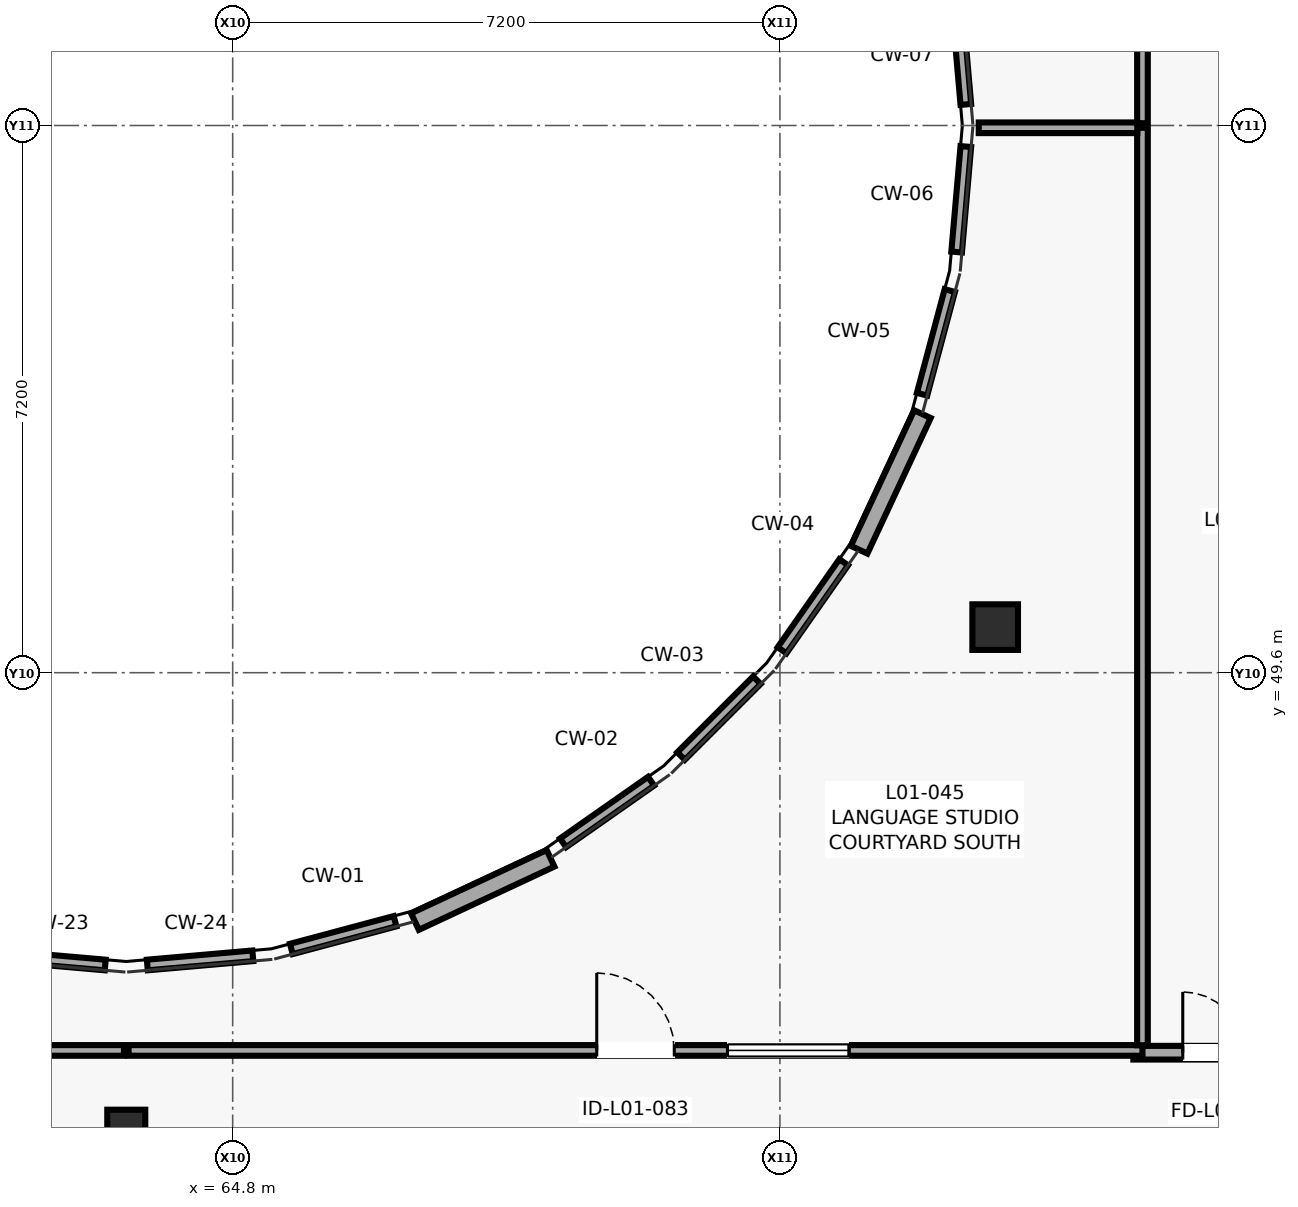
"""IFC4 building model, lengths in metres.
Left out: names, types, materials, properties, quantities, classifications, styles, units other than length and angle.
Written with IfcOpenShell. Run it as: python <this file> out.ifc"""

import sys

from ifc_helpers import new_model, si_unit, direction, frame, frame_2d, origin, origin_2d, place, context, subcontext, project, spatial, rectangle, circle, extrude, element, fill, save


model = new_model("IFC4")
c1 = context("Model", 3, precision=1e-05, world=origin(), true_north=direction((0.0, 1.0)))
c2 = subcontext(c1, "Body", "Model", "MODEL_VIEW")
j1 = project(units=[si_unit("LENGTHUNIT", "METRE"), si_unit("PLANEANGLEUNIT", "RADIAN")], contexts=[c1])
p1 = place(None, origin())
s1 = spatial("IfcSite", under=j1, at=p1, CompositionType="ELEMENT")
p2 = place(p1, origin())
s2 = spatial("IfcBuilding", under=s1, at=p2, CompositionType="ELEMENT")
p3 = place(p2, frame((0.0, 0.0, 4.2)))
s3 = spatial("IfcBuildingStorey", under=s2, at=p3, CompositionType="ELEMENT", Elevation=4.2)
p4 = place(p3, frame((63.4, 43.6, 0.0), z_axis=(0.0, 0.0, 1.0), x_axis=(1.0, 0.0, 0.0)))
e1 = element("IfcColumn", 1, at=p4, inside=s3, PredefinedType="COLUMN", context=c2, shape_type="SweptSolid", body=[
    extrude(circle(Radius=0.25, at=origin_2d()), origin(), (0.0, 0.0, 1.0), 4.0),
])
p5 = place(p3, frame((74.832, 50.2, 0.0), z_axis=(0.0, 0.0, 1.0), x_axis=(1.0, 0.0, 0.0)))
e2 = element("IfcColumn", 2, at=p5, inside=s3, PredefinedType="COLUMN", context=c2, shape_type="SweptSolid", body=[
    extrude(circle(Radius=0.3, at=origin_2d()), origin(), (0.0, 0.0, 1.0), 4.0),
])
for number, where, z_axis, x_axis in (
    (3, (67.198, 46.325, 0.0), (0.0, 0.0, 1.0), (0.906, 0.423, 0.0)),
    (4, (73.042, 51.218, 0.0), (0.0, 0.0, 1.0), (0.423, 0.906, 0.0)),
):
    element("IfcWall", number, at=place(p3, frame(where, z_axis=z_axis, x_axis=x_axis)), inside=s3, PredefinedType="SOLIDWALL", context=c2, shape_type="SweptSolid", body=[
        extrude(rectangle(XDim=1.969, YDim=0.24, at=frame_2d((0.984, 0.0))), origin(), (0.0, 0.0, 1.0), 3.78),
    ])
p6 = place(p3, frame((76.65, 44.6, 0.0), z_axis=(0.0, 0.0, 1.0), x_axis=(1.0, 0.0, 0.0)))
e5 = element("IfcWall", 5, at=p6, inside=s3, PredefinedType="PARTITIONING", context=c2, shape_type="SweptSolid", body=[
    extrude(rectangle(XDim=2.9, YDim=0.18, at=frame_2d((1.45, 0.0))), origin(), (0.0, 0.0, 1.0), 3.78),
])
p7 = place(p6, frame((0.65, 0.0, 0.0)))
e6 = element("IfcOpeningElement", 6, at=p7, cuts=e5, PredefinedType="OPENING", context=c2, shape_type="SweptSolid", body=[
    extrude(rectangle(XDim=1.6, YDim=2.25, at=frame_2d((0.8, 1.125))), frame((0.0, 0.1, 0.0), z_axis=(0.0, -1.0, 0.0), x_axis=(1.0, 0.0, 0.0)), (0.0, 0.0, 1.0), 0.2),
])
p8 = place(p3, frame((51.498, 44.63, 0.0), z_axis=(0.0, 0.0, 1.0), x_axis=(1.0, 0.0, 0.0)))
e7 = element("IfcWall", 7, at=p8, inside=s3, PredefinedType="PARTITIONING", context=c2, shape_type="SweptSolid", body=[
    extrude(rectangle(XDim=11.872, YDim=0.14, at=frame_2d((5.936, 0.0))), origin(), (0.0, 0.0, 1.0), 3.775),
])
p9 = place(p8, frame((5.436, 0.0, 0.0)))
e8 = element("IfcOpeningElement", 8, at=p9, cuts=e7, PredefinedType="OPENING", context=c2, shape_type="SweptSolid", body=[
    extrude(rectangle(XDim=1.0, YDim=2.1, at=frame_2d((0.5, 1.05))), frame((0.0, 0.08, 0.0), z_axis=(0.0, -1.0, 0.0), x_axis=(1.0, 0.0, 0.0)), (0.0, 0.0, 1.0), 0.16),
])
p10 = place(p8, frame((7.136, 0.0, 1.05)))
e9 = element("IfcOpeningElement", 9, at=p10, cuts=e7, PredefinedType="OPENING", context=c2, shape_type="SweptSolid", body=[
    extrude(rectangle(XDim=1.8, YDim=1.2, at=frame_2d((0.9, 0.6))), frame((0.0, 0.08, 0.0), z_axis=(0.0, -1.0, 0.0), x_axis=(1.0, 0.0, 0.0)), (0.0, 0.0, 1.0), 0.16),
])
p11 = place(p3, frame((63.123, 45.754, 0.0), z_axis=(0.0, 0.0, 1.0), x_axis=(-0.996215560037, 0.086916960031, 0.0)))
e10 = element("IfcWall", 10, at=p11, inside=s3, PredefinedType="PARTITIONING", context=c2, shape_type="SweptSolid", body=[
    extrude(rectangle(XDim=1.393, YDim=0.14, at=frame_2d((0.697, 0.0))), origin(), (0.0, 0.0, 1.0), 3.775),
])
p12 = place(p3, frame((72.839, 51.053, 0.0), z_axis=(0.0, 0.0, 1.0), x_axis=(-0.57368253481, -0.819077743108, 0.0)))
e11 = element("IfcWall", 11, at=p12, inside=s3, PredefinedType="PARTITIONING", context=c2, shape_type="SweptSolid", body=[
    extrude(rectangle(XDim=1.414, YDim=0.14, at=frame_2d((0.707, 0.0))), origin(), (0.0, 0.0, 1.0), 3.775),
])
p13 = place(p3, frame((71.697, 49.501, 0.0), z_axis=(0.0, 0.0, 1.0), x_axis=(-0.707106781187, -0.707106781187, 0.0)))
e12 = element("IfcWall", 12, at=p13, inside=s3, PredefinedType="PARTITIONING", context=c2, shape_type="SweptSolid", body=[
    extrude(rectangle(XDim=1.411, YDim=0.14, at=frame_2d((0.706, 0.0))), origin(), (0.0, 0.0, 1.0), 3.775),
])
p14 = place(p3, frame((70.305, 48.172, 0.0), z_axis=(0.0, 0.0, 1.0), x_axis=(-0.819077743108, -0.57368253481, 0.0)))
e13 = element("IfcWall", 13, at=p14, inside=s3, PredefinedType="PARTITIONING", context=c2, shape_type="SweptSolid", body=[
    extrude(rectangle(XDim=1.414, YDim=0.14, at=frame_2d((0.707, 0.0))), origin(), (0.0, 0.0, 1.0), 3.775),
])
p15 = place(p3, frame((66.936, 46.33, 0.0), z_axis=(0.0, 0.0, 1.0), x_axis=(-0.966013611766, -0.258491202719, 0.0)))
e14 = element("IfcWall", 14, at=p15, inside=s3, PredefinedType="PARTITIONING", context=c2, shape_type="SweptSolid", body=[
    extrude(rectangle(XDim=1.412, YDim=0.14, at=frame_2d((0.706, 0.0))), origin(), (0.0, 0.0, 1.0), 3.775),
])
p16 = place(p3, frame((65.065, 45.875, 0.0), z_axis=(0.0, 0.0, 1.0), x_axis=(-0.996215560037, -0.086916960031, 0.0)))
e15 = element("IfcWall", 15, at=p16, inside=s3, PredefinedType="PARTITIONING", context=c2, shape_type="SweptSolid", body=[
    extrude(rectangle(XDim=1.393, YDim=0.14, at=frame_2d((0.697, 0.0))), origin(), (0.0, 0.0, 1.0), 3.775),
])
p17 = place(p3, frame((63.43, 44.63, 0.0), z_axis=(0.0, 0.0, 1.0), x_axis=(1.0, 0.0, 0.0)))
e16 = element("IfcWall", 16, at=p17, inside=s3, PredefinedType="PARTITIONING", context=c2, shape_type="SweptSolid", body=[
    extrude(rectangle(XDim=13.34, YDim=0.14, at=frame_2d((6.67, 0.0))), origin(), (0.0, 0.0, 1.0), 3.775),
])
p18 = place(p17, frame((6.16, 0.0, 0.0)))
e17 = element("IfcOpeningElement", 17, at=p18, cuts=e16, PredefinedType="OPENING", context=c2, shape_type="SweptSolid", body=[
    extrude(rectangle(XDim=1.02, YDim=2.14, at=frame_2d((0.51, 1.07))), frame((0.0, 0.08, 0.0), z_axis=(0.0, -1.0, 0.0), x_axis=(1.0, 0.0, 0.0)), (0.0, 0.0, 1.0), 0.16),
])
p19 = place(p17, frame((7.88, 0.0, 1.05)))
e18 = element("IfcOpeningElement", 18, at=p19, cuts=e16, PredefinedType="OPENING", context=c2, shape_type="SweptSolid", body=[
    extrude(rectangle(XDim=1.6, YDim=1.1, at=frame_2d((0.8, 0.55))), frame((0.0, 0.08, 0.0), z_axis=(0.0, -1.0, 0.0), x_axis=(1.0, 0.0, 0.0)), (0.0, 0.0, 1.0), 0.16),
])
p20 = place(p3, frame((76.77, 44.698, 0.0), z_axis=(0.0, 0.0, 1.0), x_axis=(0.0, 1.0, 0.0)))
e19 = element("IfcWall", 19, at=p20, inside=s3, PredefinedType="PARTITIONING", context=c2, shape_type="SweptSolid", body=[
    extrude(rectangle(XDim=12.072, YDim=0.14, at=frame_2d((6.036, 0.0))), origin(), (0.0, 0.0, 1.0), 3.775),
])
p21 = place(p3, frame((76.702, 56.77, 0.0), z_axis=(0.0, 0.0, 1.0), x_axis=(-1.0, 0.0, 0.0)))
e20 = element("IfcWall", 20, at=p21, inside=s3, PredefinedType="PARTITIONING", context=c2, shape_type="SweptSolid", body=[
    extrude(rectangle(XDim=2.086, YDim=0.14, at=frame_2d((1.043, 0.0))), origin(), (0.0, 0.0, 1.0), 3.775),
])
p22 = place(p3, frame((74.446, 56.523, 0.0), z_axis=(0.0, 0.0, 1.0), x_axis=(-0.086916960031, -0.996215560037, 0.0)))
e21 = element("IfcWall", 21, at=p22, inside=s3, PredefinedType="PARTITIONING", context=c2, shape_type="SweptSolid", body=[
    extrude(rectangle(XDim=1.393, YDim=0.14, at=frame_2d((0.697, 0.0))), origin(), (0.0, 0.0, 1.0), 3.775),
])
p23 = place(p3, frame((74.235, 54.628, 0.0), z_axis=(0.0, 0.0, 1.0), x_axis=(-0.258491202719, -0.966013611766, 0.0)))
e22 = element("IfcWall", 22, at=p23, inside=s3, PredefinedType="PARTITIONING", context=c2, shape_type="SweptSolid", body=[
    extrude(rectangle(XDim=1.412, YDim=0.14, at=frame_2d((0.706, 0.0))), origin(), (0.0, 0.0, 1.0), 3.775),
])
p24 = place(p3, frame((74.325, 58.465, 0.0), z_axis=(0.0, 0.0, 1.0), x_axis=(0.086901789347, -0.996216883519, 0.0)))
e23 = element("IfcWall", 23, at=p24, inside=s3, PredefinedType="PARTITIONING", context=c2, shape_type="SweptSolid", body=[
    extrude(rectangle(XDim=1.394, YDim=0.14, at=frame_2d((0.697, 0.0))), origin(), (0.0, 0.0, 1.0), 3.775),
])
p25 = place(p3, frame((76.77, 56.83, 0.0), z_axis=(0.0, 0.0, 1.0), x_axis=(0.0, 1.0, 0.0)))
e24 = element("IfcWall", 24, at=p25, inside=s3, PredefinedType="PARTITIONING", context=c2, shape_type="SweptSolid", body=[
    extrude(rectangle(XDim=12.082, YDim=0.14, at=frame_2d((6.041, 0.0))), origin(), (0.0, 0.0, 1.0), 3.775),
])
p26 = place(p7, origin())
e25 = element("IfcDoor", 25, at=p26, inside=s3, OperationType="DOUBLE_DOOR_SINGLE_SWING", PredefinedType="DOOR", context=c2, shape_type="SweptSolid", body=[
    extrude(rectangle(XDim=1.6, YDim=2.25, at=frame_2d((0.8, 1.125))), frame((0.0, 0.025, 0.0), z_axis=(0.0, -1.0, 0.0), x_axis=(1.0, 0.0, 0.0)), (0.0, 0.0, 1.0), 0.05),
])
fill(e6, e25)
p27 = place(p18, origin())
e26 = element("IfcDoor", 26, at=p27, inside=s3, OperationType="SINGLE_SWING_LEFT", PredefinedType="DOOR", context=c2, shape_type="SweptSolid", body=[
    extrude(rectangle(XDim=1.02, YDim=2.14, at=frame_2d((0.51, 1.07))), frame((0.0, 0.025, 0.0), z_axis=(0.0, -1.0, 0.0), x_axis=(1.0, 0.0, 0.0)), (0.0, 0.0, 1.0), 0.05),
])
fill(e17, e26)
p28 = place(p19, origin())
e27 = element("IfcWindow", 27, at=p28, inside=s3, PartitioningType="SINGLE_PANEL", PredefinedType="WINDOW", context=c2, shape_type="SweptSolid", body=[
    extrude(rectangle(XDim=1.6, YDim=1.1, at=frame_2d((0.8, 0.55))), frame((0.0, 0.03, 0.0), z_axis=(0.0, -1.0, 0.0), x_axis=(1.0, 0.0, 0.0)), (0.0, 0.0, 1.0), 0.06),
])
fill(e18, e27)
save(model, sys.argv[1])
